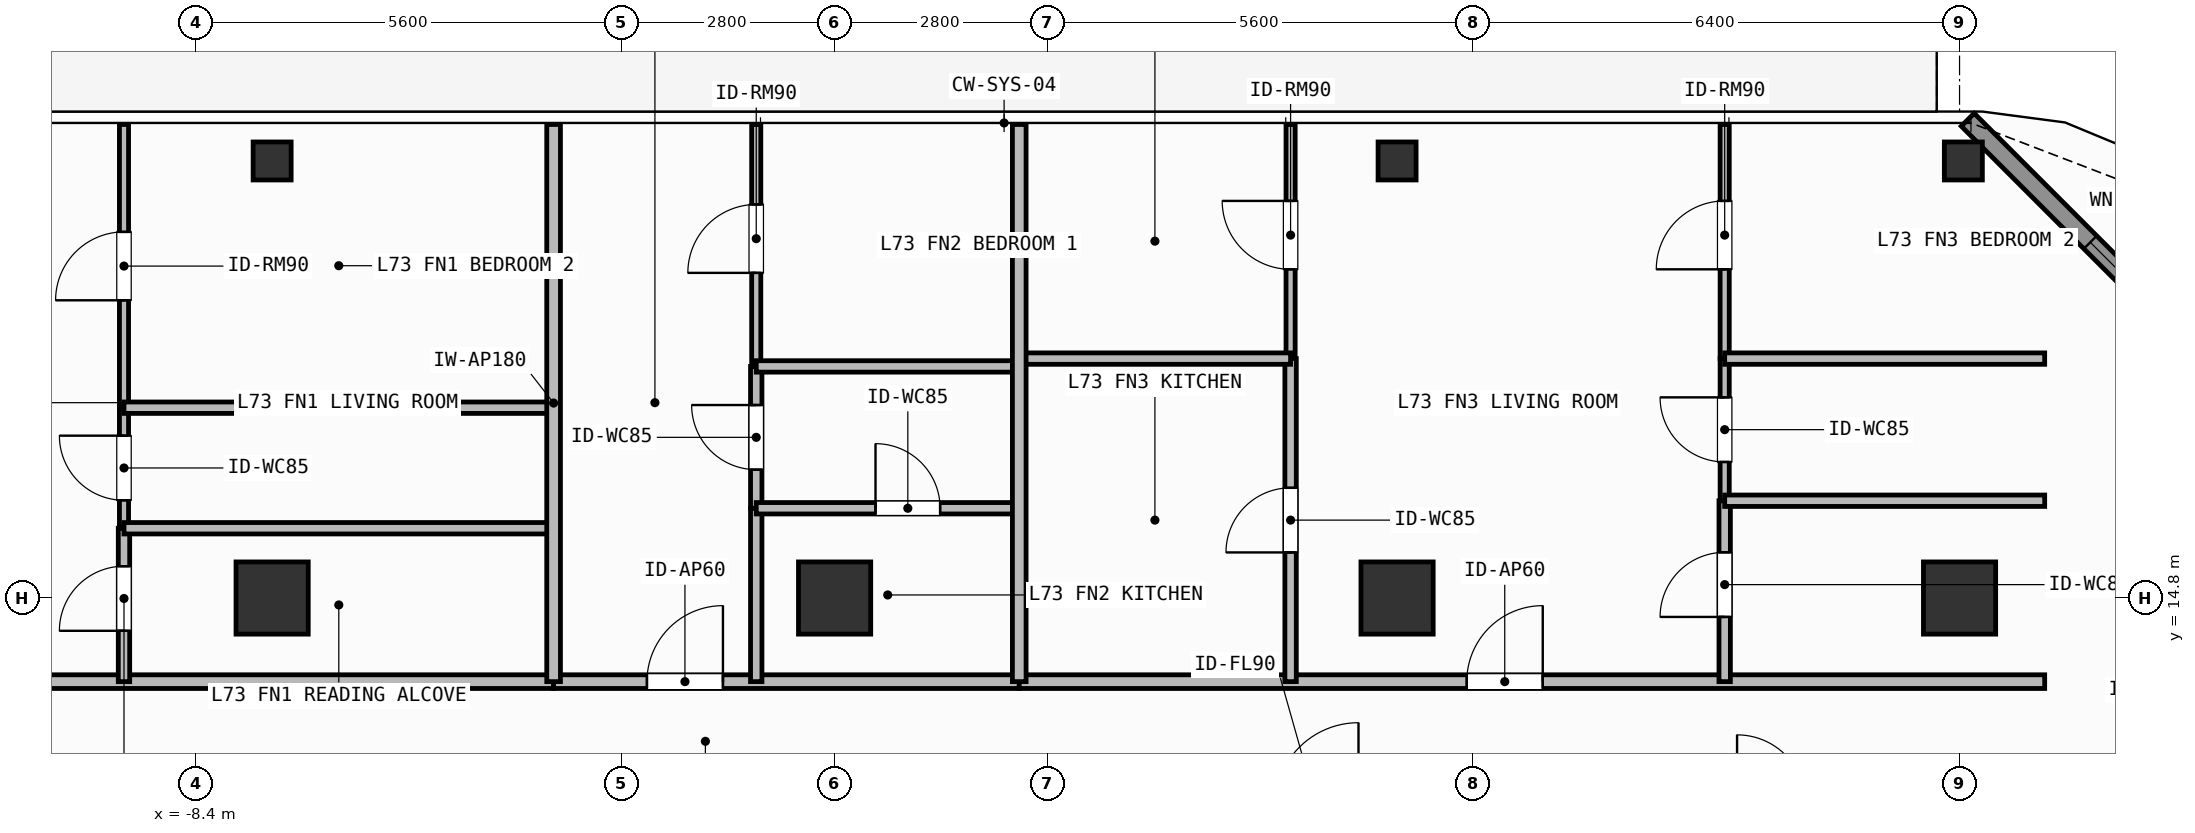
"""IFC4 building model, lengths in metres.
Left out: names, types, materials, properties, quantities, classifications, styles, units other than length and angle.
Written with IfcOpenShell. Run it as: python <this file> out.ifc"""

import sys

from ifc_helpers import new_model, si_unit, direction, frame, frame_2d, origin, origin_2d, place, context, subcontext, project, spatial, rectangle, hollow_rectangle, extrude, element, fill, save


model = new_model("IFC4")
c1 = context("Model", 3, precision=1e-05, world=origin(), true_north=direction((0.0, 1.0)))
c2 = subcontext(c1, "Body", "Model", "MODEL_VIEW")
j1 = project(units=[si_unit("LENGTHUNIT", "METRE"), si_unit("PLANEANGLEUNIT", "RADIAN")], contexts=[c1])
p1 = place(None, origin())
s1 = spatial("IfcSite", under=j1, at=p1, CompositionType="ELEMENT")
p2 = place(p1, origin())
s2 = spatial("IfcBuilding", under=s1, at=p2, CompositionType="ELEMENT")
p3 = place(p2, frame((0.0, 0.0, 297.6)))
s3 = spatial("IfcBuildingStorey", under=s2, at=p3, CompositionType="ELEMENT", Elevation=297.6)
for number, where, z_axis, x_axis in (
    (1, (-7.4, 14.8, 0.0), (0.0, 0.0, 1.0), (1.0, 0.0, 0.0)),
    (2, (0.0, 14.8, 0.0), (0.0, 0.0, 1.0), (1.0, 0.0, 0.0)),
    (3, (7.4, 14.8, 0.0), (0.0, 0.0, 1.0), (1.0, 0.0, 0.0)),
    (4, (14.8, 14.8, 0.0), (0.0, 0.0, 1.0), (1.0, 0.0, 0.0)),
):
    element("IfcColumn", number, at=place(p3, frame(where, z_axis=z_axis, x_axis=x_axis)), inside=s3, PredefinedType="COLUMN", context=c2, shape_type="SweptSolid", body=[
        extrude(rectangle(XDim=0.95, YDim=0.95, at=origin_2d()), origin(), (0.0, 0.0, 1.0), 3.9),
    ])
for number, where, z_axis, x_axis in (
    (5, (14.85, 20.55, 0.0), (0.0, 0.0, 1.0), (1.0, 0.0, 0.0)),
    (6, (-7.4, 20.55, 0.0), (0.0, 0.0, 1.0), (1.0, 0.0, 0.0)),
    (7, (7.4, 20.55, 0.0), (0.0, 0.0, 1.0), (1.0, 0.0, 0.0)),
):
    element("IfcColumn", number, at=place(p3, frame(where, z_axis=z_axis, x_axis=x_axis)), inside=s3, PredefinedType="COLUMN", context=c2, shape_type="SweptSolid", body=[
        extrude(hollow_rectangle(XDim=0.5, YDim=0.5, WallThickness=0.025, at=origin_2d()), origin(), (0.0, 0.0, 1.0), 3.9),
    ])
p4 = place(p3, frame((14.908, 21.092, 0.0), z_axis=(0.0, 0.0, 1.0), x_axis=(0.707106781187, -0.707106781187, 0.0)))
e8 = element("IfcWall", 8, at=p4, inside=s3, PredefinedType="SOLIDWALL", context=c2, shape_type="SweptSolid", body=[
    extrude(rectangle(XDim=6.059, YDim=0.24, at=frame_2d((3.03, 0.0))), origin(), (0.0, 0.0, 1.0), 3.68),
])
p5 = place(p4, frame((2.28, 0.0, 0.8)))
e9 = element("IfcOpeningElement", 9, at=p5, cuts=e8, PredefinedType="OPENING", context=c2, shape_type="SweptSolid", body=[
    extrude(rectangle(XDim=1.5, YDim=1.85, at=frame_2d((0.75, 0.925))), frame((0.0, 0.13, 0.0), z_axis=(0.0, -1.0, 0.0), x_axis=(1.0, 0.0, 0.0)), (0.0, 0.0, 1.0), 0.26),
])
p6 = place(p3, frame((-19.32, 13.7, 0.0), z_axis=(0.0, 0.0, 1.0), x_axis=(1.0, 0.0, 0.0)))
e10 = element("IfcWall", 10, at=p6, inside=s3, PredefinedType="PARTITIONING", context=c2, shape_type="SweptSolid", body=[
    extrude(rectangle(XDim=15.623, YDim=0.18, at=frame_2d((7.812, 0.0))), origin(), (0.0, 0.0, 1.0), 3.68),
])
p7 = place(p6, frame((7.669, 0.0, 0.0)))
e11 = element("IfcOpeningElement", 11, at=p7, cuts=e10, PredefinedType="OPENING", context=c2, shape_type="SweptSolid", body=[
    extrude(rectangle(XDim=1.0, YDim=2.2, at=frame_2d((0.5, 1.1))), frame((0.0, 0.1, 0.0), z_axis=(0.0, -1.0, 0.0), x_axis=(1.0, 0.0, 0.0)), (0.0, 0.0, 1.0), 0.2),
])
p8 = place(p3, frame((-9.349, 13.7, 0.0), z_axis=(0.0, 0.0, 1.0), x_axis=(0.0, 1.0, 0.0)))
e12 = element("IfcWall", 12, at=p8, inside=s3, PredefinedType="PARTITIONING", context=c2, shape_type="SweptSolid", body=[
    extrude(rectangle(XDim=2.018, YDim=0.15, at=frame_2d((1.009, 0.0))), origin(), (0.0, 0.0, 1.0), 3.68),
])
p9 = place(p8, frame((0.669, 0.0, 0.0)))
e13 = element("IfcOpeningElement", 13, at=p9, cuts=e12, PredefinedType="OPENING", context=c2, shape_type="SweptSolid", body=[
    extrude(rectangle(XDim=0.85, YDim=2.1, at=frame_2d((0.425, 1.05))), frame((0.0, 0.085, 0.0), z_axis=(0.0, -1.0, 0.0), x_axis=(1.0, 0.0, 0.0)), (0.0, 0.0, 1.0), 0.17),
])
p10 = place(p3, frame((-9.349, 15.718, 0.0), z_axis=(0.0, 0.0, 1.0), x_axis=(0.0, 1.0, 0.0)))
e14 = element("IfcWall", 14, at=p10, inside=s3, PredefinedType="PARTITIONING", context=c2, shape_type="SweptSolid", body=[
    extrude(rectangle(XDim=1.586, YDim=0.12, at=frame_2d((0.793, 0.0))), origin(), (0.0, 0.0, 1.0), 3.68),
])
p11 = place(p10, frame((0.368, 0.0, 0.0)))
e15 = element("IfcOpeningElement", 15, at=p11, cuts=e14, PredefinedType="OPENING", context=c2, shape_type="SweptSolid", body=[
    extrude(rectangle(XDim=0.85, YDim=2.1, at=frame_2d((0.425, 1.05))), frame((0.0, 0.07, 0.0), z_axis=(0.0, -1.0, 0.0), x_axis=(1.0, 0.0, 0.0)), (0.0, 0.0, 1.0), 0.14),
])
p12 = place(p3, frame((-9.349, 17.304, 0.0), z_axis=(0.0, 0.0, 1.0), x_axis=(0.0, 1.0, 0.0)))
e16 = element("IfcWall", 16, at=p12, inside=s3, PredefinedType="PARTITIONING", context=c2, shape_type="SweptSolid", body=[
    extrude(rectangle(XDim=3.726, YDim=0.12, at=frame_2d((1.863, 0.0))), origin(), (0.0, 0.0, 1.0), 3.68),
])
p13 = place(p12, frame((1.413, 0.0, 0.0)))
e17 = element("IfcOpeningElement", 17, at=p13, cuts=e16, PredefinedType="OPENING", context=c2, shape_type="SweptSolid", body=[
    extrude(rectangle(XDim=0.9, YDim=2.1, at=frame_2d((0.45, 1.05))), frame((0.0, 0.07, 0.0), z_axis=(0.0, -1.0, 0.0), x_axis=(1.0, 0.0, 0.0)), (0.0, 0.0, 1.0), 0.14),
])
p14 = place(p3, frame((-3.697, 13.7, 0.0), z_axis=(0.0, 0.0, 1.0), x_axis=(1.0, 0.0, 0.0)))
e18 = element("IfcWall", 18, at=p14, inside=s3, PredefinedType="PARTITIONING", context=c2, shape_type="SweptSolid", body=[
    extrude(rectangle(XDim=6.126, YDim=0.18, at=frame_2d((3.063, 0.0))), origin(), (0.0, 0.0, 1.0), 3.68),
])
p15 = place(p14, frame((1.228, 0.0, 0.0)))
e19 = element("IfcOpeningElement", 19, at=p15, cuts=e18, PredefinedType="OPENING", context=c2, shape_type="SweptSolid", body=[
    extrude(rectangle(XDim=1.0, YDim=2.2, at=frame_2d((0.5, 1.1))), frame((0.0, 0.1, 0.0), z_axis=(0.0, -1.0, 0.0), x_axis=(1.0, 0.0, 0.0)), (0.0, 0.0, 1.0), 0.2),
])
p16 = place(p3, frame((-1.031, 13.7, 0.0), z_axis=(0.0, 0.0, 1.0), x_axis=(0.0, 1.0, 0.0)))
e20 = element("IfcWall", 20, at=p16, inside=s3, PredefinedType="PARTITIONING", context=c2, shape_type="SweptSolid", body=[
    extrude(rectangle(XDim=2.281, YDim=0.15, at=frame_2d((1.141, 0.0))), origin(), (0.0, 0.0, 1.0), 3.68),
])
p17 = place(p3, frame((-1.031, 15.981, 0.0), z_axis=(0.0, 0.0, 1.0), x_axis=(0.0, 1.0, 0.0)))
e21 = element("IfcWall", 21, at=p17, inside=s3, PredefinedType="PARTITIONING", context=c2, shape_type="SweptSolid", body=[
    extrude(rectangle(XDim=1.866, YDim=0.15, at=frame_2d((0.933, 0.0))), origin(), (0.0, 0.0, 1.0), 3.68),
])
p18 = place(p17, frame((0.508, 0.0, 0.0)))
e22 = element("IfcOpeningElement", 22, at=p18, cuts=e21, PredefinedType="OPENING", context=c2, shape_type="SweptSolid", body=[
    extrude(rectangle(XDim=0.85, YDim=2.1, at=frame_2d((0.425, 1.05))), frame((0.0, 0.085, 0.0), z_axis=(0.0, -1.0, 0.0), x_axis=(1.0, 0.0, 0.0)), (0.0, 0.0, 1.0), 0.17),
])
p19 = place(p3, frame((-1.031, 17.847, 0.0), z_axis=(0.0, 0.0, 1.0), x_axis=(0.0, 1.0, 0.0)))
e23 = element("IfcWall", 23, at=p19, inside=s3, PredefinedType="PARTITIONING", context=c2, shape_type="SweptSolid", body=[
    extrude(rectangle(XDim=3.183, YDim=0.12, at=frame_2d((1.592, 0.0))), origin(), (0.0, 0.0, 1.0), 3.68),
])
p20 = place(p19, frame((1.231, 0.0, 0.0)))
e24 = element("IfcOpeningElement", 24, at=p20, cuts=e23, PredefinedType="OPENING", context=c2, shape_type="SweptSolid", body=[
    extrude(rectangle(XDim=0.9, YDim=2.1, at=frame_2d((0.45, 1.05))), frame((0.0, 0.07, 0.0), z_axis=(0.0, -1.0, 0.0), x_axis=(1.0, 0.0, 0.0)), (0.0, 0.0, 1.0), 0.14),
])
p21 = place(p3, frame((2.429, 13.7, 0.0), z_axis=(0.0, 0.0, 1.0), x_axis=(1.0, 0.0, 0.0)))
e25 = element("IfcWall", 25, at=p21, inside=s3, PredefinedType="PARTITIONING", context=c2, shape_type="SweptSolid", body=[
    extrude(rectangle(XDim=13.491, YDim=0.18, at=frame_2d((6.746, 0.0))), origin(), (0.0, 0.0, 1.0), 3.68),
])
p22 = place(p21, frame((5.887, 0.0, 0.0)))
e26 = element("IfcOpeningElement", 26, at=p22, cuts=e25, PredefinedType="OPENING", context=c2, shape_type="SweptSolid", body=[
    extrude(rectangle(XDim=1.0, YDim=2.2, at=frame_2d((0.5, 1.1))), frame((0.0, 0.1, 0.0), z_axis=(0.0, -1.0, 0.0), x_axis=(1.0, 0.0, 0.0)), (0.0, 0.0, 1.0), 0.2),
])
p23 = place(p3, frame((5.999, 13.7, 0.0), z_axis=(0.0, 0.0, 1.0), x_axis=(0.0, 1.0, 0.0)))
e27 = element("IfcWall", 27, at=p23, inside=s3, PredefinedType="PARTITIONING", context=c2, shape_type="SweptSolid", body=[
    extrude(rectangle(XDim=4.25, YDim=0.15, at=frame_2d((2.125, 0.0))), origin(), (0.0, 0.0, 1.0), 3.68),
])
p24 = place(p23, frame((1.7, 0.0, 0.0)))
e28 = element("IfcOpeningElement", 28, at=p24, cuts=e27, PredefinedType="OPENING", context=c2, shape_type="SweptSolid", body=[
    extrude(rectangle(XDim=0.85, YDim=2.1, at=frame_2d((0.425, 1.05))), frame((0.0, 0.085, 0.0), z_axis=(0.0, -1.0, 0.0), x_axis=(1.0, 0.0, 0.0)), (0.0, 0.0, 1.0), 0.17),
])
p25 = place(p3, frame((5.999, 17.95, 0.0), z_axis=(0.0, 0.0, 1.0), x_axis=(0.0, 1.0, 0.0)))
e29 = element("IfcWall", 29, at=p25, inside=s3, PredefinedType="PARTITIONING", context=c2, shape_type="SweptSolid", body=[
    extrude(rectangle(XDim=3.08, YDim=0.12, at=frame_2d((1.54, 0.0))), origin(), (0.0, 0.0, 1.0), 3.68),
])
p26 = place(p25, frame((1.175, 0.0, 0.0)))
e30 = element("IfcOpeningElement", 30, at=p26, cuts=e29, PredefinedType="OPENING", context=c2, shape_type="SweptSolid", body=[
    extrude(rectangle(XDim=0.9, YDim=2.1, at=frame_2d((0.45, 1.05))), frame((0.0, 0.07, 0.0), z_axis=(0.0, -1.0, 0.0), x_axis=(1.0, 0.0, 0.0)), (0.0, 0.0, 1.0), 0.14),
])
p27 = place(p3, frame((11.71, 13.7, 0.0), z_axis=(0.0, 0.0, 1.0), x_axis=(0.0, 1.0, 0.0)))
e31 = element("IfcWall", 31, at=p27, inside=s3, PredefinedType="PARTITIONING", context=c2, shape_type="SweptSolid", body=[
    extrude(rectangle(XDim=2.38, YDim=0.15, at=frame_2d((1.19, 0.0))), origin(), (0.0, 0.0, 1.0), 3.68),
])
p28 = place(p27, frame((0.851, 0.0, 0.0)))
e32 = element("IfcOpeningElement", 32, at=p28, cuts=e31, PredefinedType="OPENING", context=c2, shape_type="SweptSolid", body=[
    extrude(rectangle(XDim=0.85, YDim=2.1, at=frame_2d((0.425, 1.05))), frame((0.0, 0.085, 0.0), z_axis=(0.0, -1.0, 0.0), x_axis=(1.0, 0.0, 0.0)), (0.0, 0.0, 1.0), 0.17),
])
p29 = place(p3, frame((11.71, 16.08, 0.0), z_axis=(0.0, 0.0, 1.0), x_axis=(0.0, 1.0, 0.0)))
e33 = element("IfcWall", 33, at=p29, inside=s3, PredefinedType="PARTITIONING", context=c2, shape_type="SweptSolid", body=[
    extrude(rectangle(XDim=1.87, YDim=0.12, at=frame_2d((0.935, 0.0))), origin(), (0.0, 0.0, 1.0), 3.68),
])
p30 = place(p29, frame((0.51, 0.0, 0.0)))
e34 = element("IfcOpeningElement", 34, at=p30, cuts=e33, PredefinedType="OPENING", context=c2, shape_type="SweptSolid", body=[
    extrude(rectangle(XDim=0.85, YDim=2.1, at=frame_2d((0.425, 1.05))), frame((0.0, 0.07, 0.0), z_axis=(0.0, -1.0, 0.0), x_axis=(1.0, 0.0, 0.0)), (0.0, 0.0, 1.0), 0.14),
])
p31 = place(p3, frame((11.71, 17.95, 0.0), z_axis=(0.0, 0.0, 1.0), x_axis=(0.0, 1.0, 0.0)))
e35 = element("IfcWall", 35, at=p31, inside=s3, PredefinedType="PARTITIONING", context=c2, shape_type="SweptSolid", body=[
    extrude(rectangle(XDim=3.08, YDim=0.12, at=frame_2d((1.54, 0.0))), origin(), (0.0, 0.0, 1.0), 3.68),
])
p32 = place(p31, frame((1.175, 0.0, 0.0)))
e36 = element("IfcOpeningElement", 36, at=p32, cuts=e35, PredefinedType="OPENING", context=c2, shape_type="SweptSolid", body=[
    extrude(rectangle(XDim=0.9, YDim=2.1, at=frame_2d((0.45, 1.05))), frame((0.0, 0.07, 0.0), z_axis=(0.0, -1.0, 0.0), x_axis=(1.0, 0.0, 0.0)), (0.0, 0.0, 1.0), 0.14),
])
for number, where, z_axis, x_axis in (
    (37, (-9.349, 15.718, 0.0), (0.0, 0.0, 1.0), (1.0, 0.0, 0.0)),
    (38, (-9.349, 17.304, 0.0), (0.0, 0.0, 1.0), (1.0, 0.0, 0.0)),
):
    element("IfcWall", number, at=place(p3, frame(where, z_axis=z_axis, x_axis=x_axis)), inside=s3, PredefinedType="PARTITIONING", context=c2, shape_type="SweptSolid", body=[
        extrude(rectangle(XDim=5.652, YDim=0.15, at=frame_2d((2.826, 0.0))), origin(), (0.0, 0.0, 1.0), 3.68),
    ])
p33 = place(p3, frame((-1.031, 15.981, 0.0), z_axis=(0.0, 0.0, 1.0), x_axis=(1.0, 0.0, 0.0)))
e39 = element("IfcWall", 39, at=p33, inside=s3, PredefinedType="PARTITIONING", context=c2, shape_type="SweptSolid", body=[
    extrude(rectangle(XDim=3.46, YDim=0.15, at=frame_2d((1.73, 0.0))), origin(), (0.0, 0.0, 1.0), 3.68),
])
p34 = place(p33, frame((1.569, 0.0, 0.0)))
e40 = element("IfcOpeningElement", 40, at=p34, cuts=e39, PredefinedType="OPENING", context=c2, shape_type="SweptSolid", body=[
    extrude(rectangle(XDim=0.85, YDim=2.1, at=frame_2d((0.425, 1.05))), frame((0.0, 0.085, 0.0), z_axis=(0.0, -1.0, 0.0), x_axis=(1.0, 0.0, 0.0)), (0.0, 0.0, 1.0), 0.17),
])
p35 = place(p3, frame((-1.031, 17.847, 0.0), z_axis=(0.0, 0.0, 1.0), x_axis=(1.0, 0.0, 0.0)))
e41 = element("IfcWall", 41, at=p35, inside=s3, PredefinedType="PARTITIONING", context=c2, shape_type="SweptSolid", body=[
    extrude(rectangle(XDim=3.46, YDim=0.15, at=frame_2d((1.73, 0.0))), origin(), (0.0, 0.0, 1.0), 3.68),
])
p36 = place(p3, frame((-3.697, 13.7, 0.0), z_axis=(0.0, 0.0, 1.0), x_axis=(0.0, 1.0, 0.0)))
e42 = element("IfcWall", 42, at=p36, inside=s3, PredefinedType="PARTITIONING", context=c2, shape_type="SweptSolid", body=[
    extrude(rectangle(XDim=7.33, YDim=0.18, at=frame_2d((3.665, 0.0))), origin(), (0.0, 0.0, 1.0), 3.68),
])
p37 = place(p3, frame((2.429, 17.95, 0.0), z_axis=(0.0, 0.0, 1.0), x_axis=(1.0, 0.0, 0.0)))
e43 = element("IfcWall", 43, at=p37, inside=s3, PredefinedType="PARTITIONING", context=c2, shape_type="SweptSolid", body=[
    extrude(rectangle(XDim=3.57, YDim=0.15, at=frame_2d((1.785, 0.0))), origin(), (0.0, 0.0, 1.0), 3.68),
])
for number, where, z_axis, x_axis in (
    (44, (11.71, 16.08, 0.0), (0.0, 0.0, 1.0), (1.0, 0.0, 0.0)),
    (45, (11.71, 17.95, 0.0), (0.0, 0.0, 1.0), (1.0, 0.0, 0.0)),
):
    element("IfcWall", number, at=place(p3, frame(where, z_axis=z_axis, x_axis=x_axis)), inside=s3, PredefinedType="PARTITIONING", context=c2, shape_type="SweptSolid", body=[
        extrude(rectangle(XDim=4.21, YDim=0.15, at=frame_2d((2.105, 0.0))), origin(), (0.0, 0.0, 1.0), 3.68),
    ])
p38 = place(p3, frame((2.429, 13.7, 0.0), z_axis=(0.0, 0.0, 1.0), x_axis=(0.0, 1.0, 0.0)))
e46 = element("IfcWall", 46, at=p38, inside=s3, PredefinedType="PARTITIONING", context=c2, shape_type="SweptSolid", body=[
    extrude(rectangle(XDim=7.33, YDim=0.18, at=frame_2d((3.665, 0.0))), origin(), (0.0, 0.0, 1.0), 3.68),
])
p39 = place(p5, origin())
e47 = element("IfcWindow", 47, at=p39, inside=s3, PartitioningType="SINGLE_PANEL", PredefinedType="WINDOW", context=c2, shape_type="SweptSolid", body=[
    extrude(rectangle(XDim=1.5, YDim=1.85, at=frame_2d((0.75, 0.925))), frame((0.0, 0.03, 0.0), z_axis=(0.0, -1.0, 0.0), x_axis=(1.0, 0.0, 0.0)), (0.0, 0.0, 1.0), 0.06),
])
fill(e9, e47)
p40 = place(p9, origin())
e48 = element("IfcDoor", 48, at=p40, inside=s3, OperationType="SINGLE_SWING_LEFT", PredefinedType="DOOR", context=c2, shape_type="SweptSolid", body=[
    extrude(rectangle(XDim=0.85, YDim=2.1, at=frame_2d((0.425, 1.05))), frame((0.0, 0.025, 0.0), z_axis=(0.0, -1.0, 0.0), x_axis=(1.0, 0.0, 0.0)), (0.0, 0.0, 1.0), 0.05),
])
fill(e13, e48)
p41 = place(p11, origin())
e49 = element("IfcDoor", 49, at=p41, inside=s3, OperationType="SINGLE_SWING_RIGHT", PredefinedType="DOOR", context=c2, shape_type="SweptSolid", body=[
    extrude(rectangle(XDim=0.85, YDim=2.1, at=frame_2d((0.425, 1.05))), frame((0.0, 0.025, 0.0), z_axis=(0.0, -1.0, 0.0), x_axis=(1.0, 0.0, 0.0)), (0.0, 0.0, 1.0), 0.05),
])
fill(e15, e49)
p42 = place(p13, origin())
e50 = element("IfcDoor", 50, at=p42, inside=s3, OperationType="SINGLE_SWING_LEFT", PredefinedType="DOOR", context=c2, shape_type="SweptSolid", body=[
    extrude(rectangle(XDim=0.9, YDim=2.1, at=frame_2d((0.45, 1.05))), frame((0.0, 0.025, 0.0), z_axis=(0.0, -1.0, 0.0), x_axis=(1.0, 0.0, 0.0)), (0.0, 0.0, 1.0), 0.05),
])
fill(e17, e50)
p43 = place(p15, origin())
e51 = element("IfcDoor", 51, at=p43, inside=s3, OperationType="SINGLE_SWING_RIGHT", PredefinedType="DOOR", context=c2, shape_type="SweptSolid", body=[
    extrude(rectangle(XDim=1.0, YDim=2.2, at=frame_2d((0.5, 1.1))), frame((0.0, 0.025, 0.0), z_axis=(0.0, -1.0, 0.0), x_axis=(1.0, 0.0, 0.0)), (0.0, 0.0, 1.0), 0.05),
])
fill(e19, e51)
p44 = place(p34, origin())
e52 = element("IfcDoor", 52, at=p44, inside=s3, OperationType="SINGLE_SWING_LEFT", PredefinedType="DOOR", context=c2, shape_type="SweptSolid", body=[
    extrude(rectangle(XDim=0.85, YDim=2.1, at=frame_2d((0.425, 1.05))), frame((0.0, 0.025, 0.0), z_axis=(0.0, -1.0, 0.0), x_axis=(1.0, 0.0, 0.0)), (0.0, 0.0, 1.0), 0.05),
])
fill(e40, e52)
p45 = place(p18, origin())
e53 = element("IfcDoor", 53, at=p45, inside=s3, OperationType="SINGLE_SWING_RIGHT", PredefinedType="DOOR", context=c2, shape_type="SweptSolid", body=[
    extrude(rectangle(XDim=0.85, YDim=2.1, at=frame_2d((0.425, 1.05))), frame((0.0, 0.025, 0.0), z_axis=(0.0, -1.0, 0.0), x_axis=(1.0, 0.0, 0.0)), (0.0, 0.0, 1.0), 0.05),
])
fill(e22, e53)
p46 = place(p20, origin())
e54 = element("IfcDoor", 54, at=p46, inside=s3, OperationType="SINGLE_SWING_LEFT", PredefinedType="DOOR", context=c2, shape_type="SweptSolid", body=[
    extrude(rectangle(XDim=0.9, YDim=2.1, at=frame_2d((0.45, 1.05))), frame((0.0, 0.025, 0.0), z_axis=(0.0, -1.0, 0.0), x_axis=(1.0, 0.0, 0.0)), (0.0, 0.0, 1.0), 0.05),
])
fill(e24, e54)
p47 = place(p22, origin())
e55 = element("IfcDoor", 55, at=p47, inside=s3, OperationType="SINGLE_SWING_RIGHT", PredefinedType="DOOR", context=c2, shape_type="SweptSolid", body=[
    extrude(rectangle(XDim=1.0, YDim=2.2, at=frame_2d((0.5, 1.1))), frame((0.0, 0.025, 0.0), z_axis=(0.0, -1.0, 0.0), x_axis=(1.0, 0.0, 0.0)), (0.0, 0.0, 1.0), 0.05),
])
fill(e26, e55)
p48 = place(p24, origin())
e56 = element("IfcDoor", 56, at=p48, inside=s3, OperationType="SINGLE_SWING_LEFT", PredefinedType="DOOR", context=c2, shape_type="SweptSolid", body=[
    extrude(rectangle(XDim=0.85, YDim=2.1, at=frame_2d((0.425, 1.05))), frame((0.0, 0.025, 0.0), z_axis=(0.0, -1.0, 0.0), x_axis=(1.0, 0.0, 0.0)), (0.0, 0.0, 1.0), 0.05),
])
fill(e28, e56)
p49 = place(p26, origin())
e57 = element("IfcDoor", 57, at=p49, inside=s3, OperationType="SINGLE_SWING_RIGHT", PredefinedType="DOOR", context=c2, shape_type="SweptSolid", body=[
    extrude(rectangle(XDim=0.9, YDim=2.1, at=frame_2d((0.45, 1.05))), frame((0.0, 0.025, 0.0), z_axis=(0.0, -1.0, 0.0), x_axis=(1.0, 0.0, 0.0)), (0.0, 0.0, 1.0), 0.05),
])
fill(e30, e57)
p50 = place(p28, origin())
e58 = element("IfcDoor", 58, at=p50, inside=s3, OperationType="SINGLE_SWING_LEFT", PredefinedType="DOOR", context=c2, shape_type="SweptSolid", body=[
    extrude(rectangle(XDim=0.85, YDim=2.1, at=frame_2d((0.425, 1.05))), frame((0.0, 0.025, 0.0), z_axis=(0.0, -1.0, 0.0), x_axis=(1.0, 0.0, 0.0)), (0.0, 0.0, 1.0), 0.05),
])
fill(e32, e58)
p51 = place(p30, origin())
e59 = element("IfcDoor", 59, at=p51, inside=s3, OperationType="SINGLE_SWING_RIGHT", PredefinedType="DOOR", context=c2, shape_type="SweptSolid", body=[
    extrude(rectangle(XDim=0.85, YDim=2.1, at=frame_2d((0.425, 1.05))), frame((0.0, 0.025, 0.0), z_axis=(0.0, -1.0, 0.0), x_axis=(1.0, 0.0, 0.0)), (0.0, 0.0, 1.0), 0.05),
])
fill(e34, e59)
p52 = place(p32, origin())
e60 = element("IfcDoor", 60, at=p52, inside=s3, OperationType="SINGLE_SWING_LEFT", PredefinedType="DOOR", context=c2, shape_type="SweptSolid", body=[
    extrude(rectangle(XDim=0.9, YDim=2.1, at=frame_2d((0.45, 1.05))), frame((0.0, 0.025, 0.0), z_axis=(0.0, -1.0, 0.0), x_axis=(1.0, 0.0, 0.0)), (0.0, 0.0, 1.0), 0.05),
])
fill(e36, e60)
save(model, sys.argv[1])
